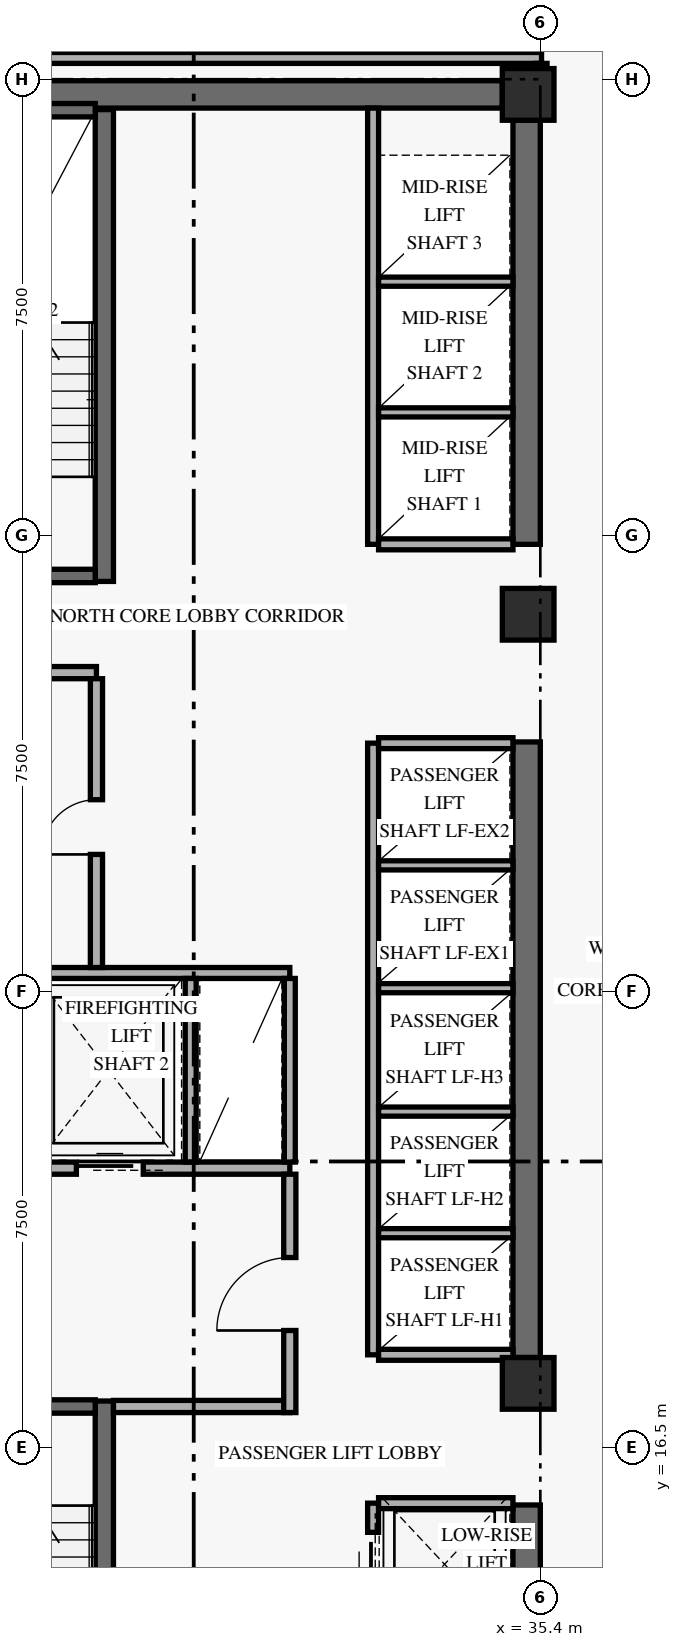
"""IFC4 building model, lengths in metres.
Left out: names, types, materials, properties, quantities, classifications, styles, units other than length and angle.
Written with IfcOpenShell. Run it as: python <this file> out.ifc"""

import sys

from ifc_helpers import new_model, si_unit, direction, frame, frame_2d, origin, origin_2d, place, context, subcontext, project, spatial, rectangle, extrude, element, fill, save


model = new_model("IFC4")
c1 = context("Model", 3, precision=1e-05, world=origin(), true_north=direction((0.0, 1.0)))
c2 = subcontext(c1, "Body", "Model", "MODEL_VIEW")
j1 = project(units=[si_unit("LENGTHUNIT", "METRE"), si_unit("PLANEANGLEUNIT", "RADIAN")], contexts=[c1])
p1 = place(None, origin())
s1 = spatial("IfcSite", under=j1, at=p1, CompositionType="ELEMENT")
p2 = place(p1, origin())
s2 = spatial("IfcBuilding", under=s1, at=p2, CompositionType="ELEMENT")
p3 = place(p2, frame((0.0, 0.0, 94.8)))
s3 = spatial("IfcBuildingStorey", under=s2, at=p3, CompositionType="ELEMENT", Elevation=94.8)
p4 = place(p3, frame((35.175, 9.675, 0.0), z_axis=(0.0, 0.0, 1.0), x_axis=(0.0, 1.0, 0.0)))
e1 = element("IfcWall", 1, at=p4, inside=s3, PredefinedType="SHEAR", context=c2, shape_type="SweptSolid", body=[
    extrude(rectangle(XDim=5.875, YDim=0.45, at=frame_2d((2.938, 0.0))), origin(), (0.0, 0.0, 1.0), 2.739),
])
p5 = place(p3, frame((35.175, 17.975, 0.0), z_axis=(0.0, 0.0, 1.0), x_axis=(0.0, 1.0, 0.0)))
e2 = element("IfcWall", 2, at=p5, inside=s3, PredefinedType="SHEAR", context=c2, shape_type="SweptSolid", body=[
    extrude(rectangle(XDim=10.125, YDim=0.45, at=frame_2d((5.062, 0.0))), origin(), (0.0, 0.0, 1.0), 2.739),
])
p6 = place(p3, frame((35.175, 31.35, 0.0), z_axis=(0.0, 0.0, 1.0), x_axis=(0.0, 1.0, 0.0)))
e3 = element("IfcWall", 3, at=p6, inside=s3, PredefinedType="SHEAR", context=c2, shape_type="SweptSolid", body=[
    extrude(rectangle(XDim=6.975, YDim=0.45, at=frame_2d((3.487, 0.0))), origin(), (0.0, 0.0, 1.0), 2.739),
])
p7 = place(p3, frame((24.625, 38.75, 0.0), z_axis=(0.0, 0.0, 1.0), x_axis=(1.0, 0.0, 0.0)))
e4 = element("IfcWall", 4, at=p7, inside=s3, PredefinedType="SHEAR", context=c2, shape_type="SweptSolid", body=[
    extrude(rectangle(XDim=10.15, YDim=0.45, at=frame_2d((5.075, 0.0))), origin(), (0.0, 0.0, 1.0), 3.35),
])
p8 = place(p3, frame((28.23, 9.5, 0.0), z_axis=(0.0, 0.0, 1.0), x_axis=(0.0, 1.0, 0.0)))
e5 = element("IfcWall", 5, at=p8, inside=s3, PredefinedType="SHEAR", context=c2, shape_type="SweptSolid", body=[
    extrude(rectangle(XDim=7.76, YDim=0.3, at=frame_2d((3.88, 0.0))), origin(), (0.0, 0.0, 1.0), 3.35),
])
p9 = place(p3, frame((24.92, 17.17, 0.0), z_axis=(0.0, 0.0, 1.0), x_axis=(1.0, 0.0, 0.0)))
e6 = element("IfcWall", 6, at=p9, inside=s3, PredefinedType="SHEAR", context=c2, shape_type="SweptSolid", body=[
    extrude(rectangle(XDim=3.16, YDim=0.22, at=frame_2d((1.58, 0.0))), origin(), (0.0, 0.0, 1.0), 3.35),
])
p10 = place(p9, frame((0.78, 0.0, 0.0)))
e7 = element("IfcOpeningElement", 7, at=p10, cuts=e6, PredefinedType="OPENING", context=c2, shape_type="SweptSolid", body=[
    extrude(rectangle(XDim=1.05, YDim=2.15, at=frame_2d((0.525, 1.075))), frame((0.0, 0.12, 0.0), z_axis=(0.0, -1.0, 0.0), x_axis=(1.0, 0.0, 0.0)), (0.0, 0.0, 1.0), 0.24),
])
p11 = place(p3, frame((28.23, 30.74, 0.0), z_axis=(0.0, 0.0, 1.0), x_axis=(0.0, 1.0, 0.0)))
e8 = element("IfcWall", 8, at=p11, inside=s3, PredefinedType="SHEAR", context=c2, shape_type="SweptSolid", body=[
    extrude(rectangle(XDim=7.76, YDim=0.3, at=frame_2d((3.88, 0.0))), origin(), (0.0, 0.0, 1.0), 3.35),
])
p12 = place(p3, frame((24.92, 30.83, 0.0), z_axis=(0.0, 0.0, 1.0), x_axis=(1.0, 0.0, 0.0)))
e9 = element("IfcWall", 9, at=p12, inside=s3, PredefinedType="SHEAR", context=c2, shape_type="SweptSolid", body=[
    extrude(rectangle(XDim=3.16, YDim=0.22, at=frame_2d((1.58, 0.0))), origin(), (0.0, 0.0, 1.0), 3.35),
])
p13 = place(p12, frame((0.78, 0.0, 0.0)))
e10 = element("IfcOpeningElement", 10, at=p13, cuts=e9, PredefinedType="OPENING", context=c2, shape_type="SweptSolid", body=[
    extrude(rectangle(XDim=1.05, YDim=2.15, at=frame_2d((0.525, 1.075))), frame((0.0, 0.12, 0.0), z_axis=(0.0, -1.0, 0.0), x_axis=(1.0, 0.0, 0.0)), (0.0, 0.0, 1.0), 0.24),
])
p14 = place(p3, frame((24.92, 38.49, 0.0), z_axis=(0.0, 0.0, 1.0), x_axis=(1.0, 0.0, 0.0)))
e11 = element("IfcWall", 11, at=p14, inside=s3, PredefinedType="SHEAR", context=c2, shape_type="SweptSolid", body=[
    extrude(rectangle(XDim=3.16, YDim=0.22, at=frame_2d((1.58, 0.0))), origin(), (0.0, 0.0, 1.0), 3.35),
])
for number, where, z_axis, x_axis in (
    (12, (35.2, 17.55, 0.0), (0.0, 0.0, 1.0), (1.0, 0.0, 0.0)),
    (13, (35.2, 30.2, 0.0), (0.0, 0.0, 1.0), (1.0, 0.0, 0.0)),
    (14, (35.2, 38.75, 0.0), (0.0, 0.0, 1.0), (1.0, 0.0, 0.0)),
):
    element("IfcColumn", number, at=place(p3, frame(where, z_axis=z_axis, x_axis=x_axis)), inside=s3, PredefinedType="COLUMN", context=c2, shape_type="SweptSolid", body=[
        extrude(rectangle(XDim=0.85, YDim=0.85, at=origin_2d()), origin(), (0.0, 0.0, 1.0), 3.6),
    ])
p15 = place(p3, frame((24.45, 21.09, 0.0), z_axis=(0.0, 0.0, 1.0), x_axis=(1.0, 0.0, 0.0)))
e15 = element("IfcWall", 15, at=p15, inside=s3, PredefinedType="STANDARD", context=c2, shape_type="SweptSolid", body=[
    extrude(rectangle(XDim=6.83, YDim=0.2, at=frame_2d((3.415, 0.0))), origin(), (0.0, 0.0, 1.0), 3.35),
])
p16 = place(p15, frame((0.72, 0.0, 0.0)))
e16 = element("IfcOpeningElement", 16, at=p16, cuts=e15, PredefinedType="OPENING", context=c2, shape_type="SweptSolid", body=[
    extrude(rectangle(XDim=1.1, YDim=2.2, at=frame_2d((0.55, 1.1))), frame((0.0, 0.11, 0.0), z_axis=(0.0, -1.0, 0.0), x_axis=(1.0, 0.0, 0.0)), (0.0, 0.0, 1.0), 0.22),
])
p17 = place(p15, frame((3.32, 0.0, 0.0)))
e17 = element("IfcOpeningElement", 17, at=p17, cuts=e15, PredefinedType="OPENING", context=c2, shape_type="SweptSolid", body=[
    extrude(rectangle(XDim=1.1, YDim=2.2, at=frame_2d((0.55, 1.1))), frame((0.0, 0.11, 0.0), z_axis=(0.0, -1.0, 0.0), x_axis=(1.0, 0.0, 0.0)), (0.0, 0.0, 1.0), 0.22),
])
p18 = place(p3, frame((28.38, 17.17, 0.0), z_axis=(0.0, 0.0, 1.0), x_axis=(1.0, 0.0, 0.0)))
e18 = element("IfcWall", 18, at=p18, inside=s3, PredefinedType="STANDARD", context=c2, shape_type="SweptSolid", body=[
    extrude(rectangle(XDim=2.9, YDim=0.2, at=frame_2d((1.45, 0.0))), origin(), (0.0, 0.0, 1.0), 3.35),
])
p19 = place(p3, frame((31.28, 17.07, 0.0), z_axis=(0.0, 0.0, 1.0), x_axis=(0.0, 1.0, 0.0)))
e19 = element("IfcWall", 19, at=p19, inside=s3, PredefinedType="STANDARD", context=c2, shape_type="SweptSolid", body=[
    extrude(rectangle(XDim=3.92, YDim=0.2, at=frame_2d((1.96, 0.0))), origin(), (0.0, 0.0, 1.0), 2.721),
])
p20 = place(p19, frame((1.35, 0.0, 0.0)))
e20 = element("IfcOpeningElement", 20, at=p20, cuts=e19, PredefinedType="OPENING", context=c2, shape_type="SweptSolid", body=[
    extrude(rectangle(XDim=1.2, YDim=2.15, at=frame_2d((0.6, 1.075))), frame((0.0, 0.11, 0.0), z_axis=(0.0, -1.0, 0.0), x_axis=(1.0, 0.0, 0.0)), (0.0, 0.0, 1.0), 0.22),
])
p21 = place(p3, frame((24.45, 24.3, 0.0), z_axis=(0.0, 0.0, 1.0), x_axis=(1.0, 0.0, 0.0)))
e21 = element("IfcWall", 21, at=p21, inside=s3, PredefinedType="STANDARD", context=c2, shape_type="SweptSolid", body=[
    extrude(rectangle(XDim=6.83, YDim=0.18, at=frame_2d((3.415, 0.0))), origin(), (0.0, 0.0, 1.0), 3.35),
])
for number, where, z_axis, x_axis in (
    (22, (29.65, 21.19, 0.0), (0.0, 0.0, 1.0), (0.0, 1.0, 0.0)),
    (23, (31.28, 21.19, 0.0), (0.0, 0.0, 1.0), (0.0, 1.0, 0.0)),
):
    element("IfcWall", number, at=place(p3, frame(where, z_axis=z_axis, x_axis=x_axis)), inside=s3, PredefinedType="STANDARD", context=c2, shape_type="SweptSolid", body=[
        extrude(rectangle(XDim=3.02, YDim=0.18, at=frame_2d((1.51, 0.0))), origin(), (0.0, 0.0, 1.0), 3.35),
    ])
p22 = place(p3, frame((24.45, 29.24, 0.0), z_axis=(0.0, 0.0, 1.0), x_axis=(1.0, 0.0, 0.0)))
e24 = element("IfcWall", 24, at=p22, inside=s3, PredefinedType="STANDARD", context=c2, shape_type="SweptSolid", body=[
    extrude(rectangle(XDim=3.65, YDim=0.2, at=frame_2d((1.825, 0.0))), origin(), (0.0, 0.0, 1.0), 3.35),
])
p23 = place(p3, frame((28.1, 24.39, 0.0), z_axis=(0.0, 0.0, 1.0), x_axis=(0.0, 1.0, 0.0)))
e25 = element("IfcWall", 25, at=p23, inside=s3, PredefinedType="STANDARD", context=c2, shape_type="SweptSolid", body=[
    extrude(rectangle(XDim=4.75, YDim=0.2, at=frame_2d((2.375, 0.0))), origin(), (0.0, 0.0, 1.0), 3.35),
])
p24 = place(p23, frame((1.86, 0.0, 0.0)))
e26 = element("IfcOpeningElement", 26, at=p24, cuts=e25, PredefinedType="OPENING", context=c2, shape_type="SweptSolid", body=[
    extrude(rectangle(XDim=0.9, YDim=2.1, at=frame_2d((0.45, 1.05))), frame((0.0, 0.11, 0.0), z_axis=(0.0, -1.0, 0.0), x_axis=(1.0, 0.0, 0.0)), (0.0, 0.0, 1.0), 0.22),
])
p25 = place(p3, frame((32.65, 9.5, 0.0), z_axis=(0.0, 0.0, 1.0), x_axis=(0.0, 1.0, 0.0)))
e27 = element("IfcWall", 27, at=p25, inside=s3, PredefinedType="STANDARD", context=c2, shape_type="SweptSolid", body=[
    extrude(rectangle(XDim=6.08, YDim=0.18, at=frame_2d((3.04, 0.0))), origin(), (0.0, 0.0, 1.0), 3.35),
])
p26 = place(p25, frame((0.55, 0.0, 0.0)))
e28 = element("IfcOpeningElement", 28, at=p26, cuts=e27, PredefinedType="OPENING", context=c2, shape_type="SweptSolid", body=[
    extrude(rectangle(XDim=1.05, YDim=2.2, at=frame_2d((0.525, 1.1))), frame((0.0, 0.1, 0.0), z_axis=(0.0, -1.0, 0.0), x_axis=(1.0, 0.0, 0.0)), (0.0, 0.0, 1.0), 0.2),
])
p27 = place(p25, frame((2.55, 0.0, 0.0)))
e29 = element("IfcOpeningElement", 29, at=p27, cuts=e27, PredefinedType="OPENING", context=c2, shape_type="SweptSolid", body=[
    extrude(rectangle(XDim=1.05, YDim=2.2, at=frame_2d((0.525, 1.1))), frame((0.0, 0.1, 0.0), z_axis=(0.0, -1.0, 0.0), x_axis=(1.0, 0.0, 0.0)), (0.0, 0.0, 1.0), 0.2),
])
p28 = place(p25, frame((4.55, 0.0, 0.0)))
e30 = element("IfcOpeningElement", 30, at=p28, cuts=e27, PredefinedType="OPENING", context=c2, shape_type="SweptSolid", body=[
    extrude(rectangle(XDim=1.05, YDim=2.2, at=frame_2d((0.525, 1.1))), frame((0.0, 0.1, 0.0), z_axis=(0.0, -1.0, 0.0), x_axis=(1.0, 0.0, 0.0)), (0.0, 0.0, 1.0), 0.2),
])
p29 = place(p3, frame((32.74, 15.58, 0.0), z_axis=(0.0, 0.0, 1.0), x_axis=(1.0, 0.0, 0.0)))
e31 = element("IfcWall", 31, at=p29, inside=s3, PredefinedType="STANDARD", context=c2, shape_type="SweptSolid", body=[
    extrude(rectangle(XDim=2.21, YDim=0.18, at=frame_2d((1.105, 0.0))), origin(), (0.0, 0.0, 1.0), 3.35),
])
p30 = place(p3, frame((32.65, 18.02, 0.0), z_axis=(0.0, 0.0, 1.0), x_axis=(0.0, 1.0, 0.0)))
e32 = element("IfcWall", 32, at=p30, inside=s3, PredefinedType="STANDARD", context=c2, shape_type="SweptSolid", body=[
    extrude(rectangle(XDim=10.06, YDim=0.18, at=frame_2d((5.03, 0.0))), origin(), (0.0, 0.0, 1.0), 3.35),
])
for number, where, z_axis, x_axis in (
    (33, (32.74, 18.02, 0.0), (0.0, 0.0, 1.0), (1.0, 0.0, 0.0)),
    (34, (32.74, 28.08, 0.0), (0.0, 0.0, 1.0), (1.0, 0.0, 0.0)),
):
    element("IfcWall", number, at=place(p3, frame(where, z_axis=z_axis, x_axis=x_axis)), inside=s3, PredefinedType="STANDARD", context=c2, shape_type="SweptSolid", body=[
        extrude(rectangle(XDim=2.21, YDim=0.18, at=frame_2d((1.105, 0.0))), origin(), (0.0, 0.0, 1.0), 3.35),
    ])
for number, where, z_axis, x_axis in (
    (35, (32.74, 20.02, 0.0), (0.0, 0.0, 1.0), (1.0, 0.0, 0.0)),
    (36, (32.74, 22.02, 0.0), (0.0, 0.0, 1.0), (1.0, 0.0, 0.0)),
    (37, (32.74, 24.05, 0.0), (0.0, 0.0, 1.0), (1.0, 0.0, 0.0)),
    (38, (32.74, 26.07, 0.0), (0.0, 0.0, 1.0), (1.0, 0.0, 0.0)),
):
    element("IfcWall", number, at=place(p3, frame(where, z_axis=z_axis, x_axis=x_axis)), inside=s3, PredefinedType="STANDARD", context=c2, shape_type="SweptSolid", body=[
        extrude(rectangle(XDim=2.21, YDim=0.15, at=frame_2d((1.105, 0.0))), origin(), (0.0, 0.0, 1.0), 3.35),
    ])
p31 = place(p3, frame((32.65, 31.35, 0.0), z_axis=(0.0, 0.0, 1.0), x_axis=(0.0, 1.0, 0.0)))
e39 = element("IfcWall", 39, at=p31, inside=s3, PredefinedType="STANDARD", context=c2, shape_type="SweptSolid", body=[
    extrude(rectangle(XDim=7.175, YDim=0.18, at=frame_2d((3.587, 0.0))), origin(), (0.0, 0.0, 1.0), 3.35),
])
p32 = place(p3, frame((32.74, 31.35, 0.0), z_axis=(0.0, 0.0, 1.0), x_axis=(1.0, 0.0, 0.0)))
e40 = element("IfcWall", 40, at=p32, inside=s3, PredefinedType="STANDARD", context=c2, shape_type="SweptSolid", body=[
    extrude(rectangle(XDim=2.21, YDim=0.18, at=frame_2d((1.105, 0.0))), origin(), (0.0, 0.0, 1.0), 3.35),
])
for number, where, z_axis, x_axis in (
    (41, (32.74, 33.52, 0.0), (0.0, 0.0, 1.0), (1.0, 0.0, 0.0)),
    (42, (32.74, 35.67, 0.0), (0.0, 0.0, 1.0), (1.0, 0.0, 0.0)),
):
    element("IfcWall", number, at=place(p3, frame(where, z_axis=z_axis, x_axis=x_axis)), inside=s3, PredefinedType="STANDARD", context=c2, shape_type="SweptSolid", body=[
        extrude(rectangle(XDim=2.21, YDim=0.15, at=frame_2d((1.105, 0.0))), origin(), (0.0, 0.0, 1.0), 3.35),
    ])
p33 = place(p3, frame((23.75, 39.35, 0.0), z_axis=(0.0, 0.0, 1.0), x_axis=(1.0, 0.0, 0.0)))
e43 = element("IfcWall", 43, at=p33, inside=s3, PredefinedType="STANDARD", context=c2, shape_type="SweptSolid", body=[
    extrude(rectangle(XDim=11.67, YDim=0.18, at=frame_2d((5.835, 0.0))), origin(), (0.0, 0.0, 1.0), 2.721),
])
p34 = place(p3, frame((35.42, 38.75, 0.0), z_axis=(0.0, 0.0, 1.0), x_axis=(0.0, 1.0, 0.0)))
e44 = element("IfcWall", 44, at=p34, inside=s3, PredefinedType="STANDARD", context=c2, shape_type="SweptSolid", body=[
    extrude(rectangle(XDim=0.51, YDim=0.18, at=frame_2d((0.255, 0.0))), origin(), (0.0, 0.0, 1.0), 2.721),
])
p35 = place(p17, origin())
e45 = element("IfcDoor", 45, at=p35, inside=s3, OperationType="SLIDING_TO_LEFT", PredefinedType="DOOR", context=c2, shape_type="SweptSolid", body=[
    extrude(rectangle(XDim=1.1, YDim=2.2, at=frame_2d((0.55, 1.1))), frame((0.0, 0.025, 0.0), z_axis=(0.0, -1.0, 0.0), x_axis=(1.0, 0.0, 0.0)), (0.0, 0.0, 1.0), 0.05),
])
fill(e17, e45)
p36 = place(p20, origin())
e46 = element("IfcDoor", 46, at=p36, inside=s3, OperationType="SINGLE_SWING_LEFT", PredefinedType="DOOR", context=c2, shape_type="SweptSolid", body=[
    extrude(rectangle(XDim=1.2, YDim=2.15, at=frame_2d((0.6, 1.075))), frame((0.0, 0.025, 0.0), z_axis=(0.0, -1.0, 0.0), x_axis=(1.0, 0.0, 0.0)), (0.0, 0.0, 1.0), 0.05),
])
fill(e20, e46)
p37 = place(p24, origin())
e47 = element("IfcDoor", 47, at=p37, inside=s3, OperationType="SINGLE_SWING_LEFT", PredefinedType="DOOR", context=c2, shape_type="SweptSolid", body=[
    extrude(rectangle(XDim=0.9, YDim=2.1, at=frame_2d((0.45, 1.05))), frame((0.0, 0.025, 0.0), z_axis=(0.0, -1.0, 0.0), x_axis=(1.0, 0.0, 0.0)), (0.0, 0.0, 1.0), 0.05),
])
fill(e26, e47)
p38 = place(p28, origin())
e48 = element("IfcDoor", 48, at=p38, inside=s3, OperationType="SLIDING_TO_LEFT", PredefinedType="DOOR", context=c2, shape_type="SweptSolid", body=[
    extrude(rectangle(XDim=1.05, YDim=2.2, at=frame_2d((0.525, 1.1))), frame((0.0, 0.025, 0.0), z_axis=(0.0, -1.0, 0.0), x_axis=(1.0, 0.0, 0.0)), (0.0, 0.0, 1.0), 0.05),
])
fill(e30, e48)
save(model, sys.argv[1])
